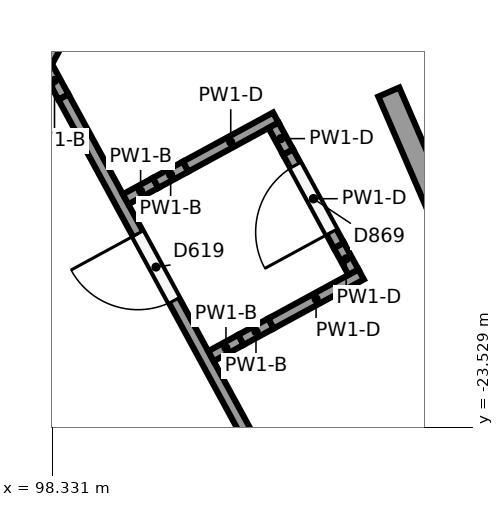
"""IFC4 building model, lengths in metres.
Left out: names, types, materials, properties, quantities, classifications, styles, units other than length and angle.
Written with IfcOpenShell. Run it as: python <this file> out.ifc"""

import sys

from ifc_helpers import new_model, si_unit, direction, frame, frame_2d, origin, origin_2d, place, context, subcontext, project, spatial, rectangle, circle, extrude, element, fill, save


model = new_model("IFC4")
c1 = context("Model", 3, precision=1e-05, world=origin(), true_north=direction((0.0, 1.0)))
c2 = subcontext(c1, "Body", "Model", "MODEL_VIEW")
j1 = project(units=[si_unit("LENGTHUNIT", "METRE"), si_unit("PLANEANGLEUNIT", "RADIAN")], contexts=[c1])
p1 = place(None, origin())
s1 = spatial("IfcSite", under=j1, at=p1, CompositionType="ELEMENT")
p2 = place(p1, origin())
s2 = spatial("IfcBuilding", under=s1, at=p2, CompositionType="ELEMENT")
p3 = place(p2, origin())
s3 = spatial("IfcBuildingStorey", under=s2, at=p3, CompositionType="ELEMENT", Elevation=0.0)
for number, where, z_axis, x_axis in (
    (1, (98.6, -18.75, -0.3), (0.0, 0.0, 1.0), (1.0, 0.0, 0.0)),
    (2, (102.6, -18.75, -0.3), (0.0, 0.0, 1.0), (1.0, 0.0, 0.0)),
):
    element("IfcColumn", number, at=place(p3, frame(where, z_axis=z_axis, x_axis=x_axis)), inside=s3, PredefinedType="COLUMN", context=c2, shape_type="SweptSolid", body=[
        extrude(circle(Radius=0.4, at=origin_2d()), origin(), (0.0, 0.0, 1.0), 6.8),
    ])
p4 = place(p3, frame((102.759, -19.117, 0.0), z_axis=(0.0, 0.0, 1.0), x_axis=(0.396578253752, -0.918000919744, 0.0)))
e3 = element("IfcWall", 3, at=p4, inside=s3, PredefinedType="SOLIDWALL", context=c2, shape_type="SweptSolid", body=[
    extrude(rectangle(XDim=4.208, YDim=0.3, at=frame_2d((2.104, 0.0))), origin(), (0.0, 0.0, 1.0), 4.85),
])
p5 = place(p3, frame((94.815, -19.145, 0.0), z_axis=(0.0, 0.0, 1.0), x_axis=(0.477867771117, -0.878431780691, 0.0)))
e4 = element("IfcWall", 4, at=p5, inside=s3, PredefinedType="SOLIDWALL", context=c2, shape_type="SweptSolid", body=[
    extrude(rectangle(XDim=13.28, YDim=0.3, at=frame_2d((6.64, 0.0))), origin(), (0.0, 0.0, 1.0), 4.85),
])
p6 = place(p5, frame((2.45, 0.0, 0.0)))
e5 = element("IfcOpeningElement", 5, at=p6, cuts=e4, PredefinedType="OPENING", context=c2, shape_type="SweptSolid", body=[
    extrude(rectangle(XDim=1.0, YDim=2.1, at=frame_2d((0.5, 1.05))), frame((0.0, 0.16, 0.0), z_axis=(0.0, -1.0, 0.0), x_axis=(1.0, 0.0, 0.0)), (0.0, 0.0, 1.0), 0.32),
])
p7 = place(p3, frame((104.808, -30.819, 0.0), z_axis=(0.0, 0.0, 1.0), x_axis=(-0.477860264875, 0.878435864052, 0.0)))
e6 = element("IfcWall", 6, at=p7, inside=s3, PredefinedType="PARTITIONING", context=c2, shape_type="SweptSolid", body=[
    extrude(rectangle(XDim=13.249, YDim=0.15, at=frame_2d((6.625, 0.0))), origin(), (0.0, 0.0, 1.0), 4.85),
])
p8 = place(p7, frame((10.2, 0.0, 0.0)))
e7 = element("IfcOpeningElement", 7, at=p8, cuts=e6, PredefinedType="OPENING", context=c2, shape_type="SweptSolid", body=[
    extrude(rectangle(XDim=1.0, YDim=2.1, at=frame_2d((0.5, 1.05))), frame((0.0, 0.085, 0.0), z_axis=(0.0, -1.0, 0.0), x_axis=(1.0, 0.0, 0.0)), (0.0, 0.0, 1.0), 0.17),
])
p9 = place(p3, frame((98.477, -19.181, 0.0), z_axis=(0.0, 0.0, 1.0), x_axis=(-0.477805639801, 0.878465577342, 0.0)))
e8 = element("IfcWall", 8, at=p9, inside=s3, PredefinedType="PARTITIONING", context=c2, shape_type="SweptSolid", body=[
    extrude(rectangle(XDim=0.49, YDim=0.15, at=frame_2d((0.245, 0.0))), origin(), (0.0, 0.0, 1.0), 4.85),
])
p10 = place(p3, frame((98.243, -18.75, 0.0), z_axis=(0.0, 0.0, 1.0), x_axis=(0.477924582155, 0.878400873048, 0.0)))
e9 = element("IfcWall", 9, at=p10, inside=s3, PredefinedType="PARTITIONING", context=c2, shape_type="SweptSolid", body=[
    extrude(rectangle(XDim=0.498, YDim=0.15, at=frame_2d((0.249, 0.0))), origin(), (0.0, 0.0, 1.0), 4.85),
])
for number, where, z_axis, x_axis in (
    (10, (100.418, -22.592, 0.0), (0.0, 0.0, 1.0), (0.878, 0.478, 0.0)),
    (11, (100.813, -22.377, 0.0), (0.0, 0.0, 1.0), (0.878, 0.478, 0.0)),
):
    element("IfcWall", number, at=place(p3, frame(where, z_axis=z_axis, x_axis=x_axis)), inside=s3, PredefinedType="PARTITIONING", context=c2, shape_type="SweptSolid", body=[
        extrude(rectangle(XDim=0.45, YDim=0.15, at=frame_2d((0.225, 0.0))), origin(), (0.0, 0.0, 1.0), 4.85),
    ])
p11 = place(p3, frame((101.209, -22.162, 0.0), z_axis=(0.0, 0.0, 1.0), x_axis=(0.878447942246, 0.477838061234, 0.0)))
e12 = element("IfcWall", 12, at=p11, inside=s3, PredefinedType="PARTITIONING", context=c2, shape_type="SweptSolid", body=[
    extrude(rectangle(XDim=1.35, YDim=0.15, at=frame_2d((0.675, 0.0))), origin(), (0.0, 0.0, 1.0), 6.1),
])
for number, where, z_axis, x_axis in (
    (13, (99.295, -20.528, 0.0), (0.0, 0.0, 1.0), (0.878, 0.478, 0.0)),
    (14, (99.69, -20.312, 0.0), (0.0, 0.0, 1.0), (0.878, 0.478, 0.0)),
):
    element("IfcWall", number, at=place(p3, frame(where, z_axis=z_axis, x_axis=x_axis)), inside=s3, PredefinedType="PARTITIONING", context=c2, shape_type="SweptSolid", body=[
        extrude(rectangle(XDim=0.45, YDim=0.15, at=frame_2d((0.225, 0.0))), origin(), (0.0, 0.0, 1.0), 4.85),
    ])
p12 = place(p3, frame((100.086, -20.097, 0.0), z_axis=(0.0, 0.0, 1.0), x_axis=(0.878447942246, 0.477838061234, 0.0)))
e15 = element("IfcWall", 15, at=p12, inside=s3, PredefinedType="PARTITIONING", context=c2, shape_type="SweptSolid", body=[
    extrude(rectangle(XDim=1.35, YDim=0.15, at=frame_2d((0.675, 0.0))), origin(), (0.0, 0.0, 1.0), 6.1),
])
p13 = place(p3, frame((102.293, -21.487, 0.0), z_axis=(0.0, 0.0, 1.0), x_axis=(-0.477953755799, 0.878384999483, 0.0)))
e16 = element("IfcWall", 16, at=p13, inside=s3, PredefinedType="PARTITIONING", context=c2, shape_type="SweptSolid", body=[
    extrude(rectangle(XDim=0.4, YDim=0.15, at=frame_2d((0.2, 0.0))), origin(), (0.0, 0.0, 1.0), 6.1),
])
p14 = place(p3, frame((102.102, -21.135, 0.0), z_axis=(0.0, 0.0, 1.0), x_axis=(-0.477984423658, 0.878368311553, 0.0)))
e17 = element("IfcWall", 17, at=p14, inside=s3, PredefinedType="PARTITIONING", context=c2, shape_type="SweptSolid", body=[
    extrude(rectangle(XDim=1.4, YDim=0.15, at=frame_2d((0.7, 0.0))), origin(), (0.0, 0.0, 1.0), 6.1),
])
p15 = place(p14, frame((0.2, 0.0, 0.0)))
e18 = element("IfcOpeningElement", 18, at=p15, cuts=e17, PredefinedType="OPENING", context=c2, shape_type="SweptSolid", body=[
    extrude(rectangle(XDim=1.0, YDim=2.1, at=frame_2d((0.5, 1.05))), frame((0.0, 0.085, 0.0), z_axis=(0.0, -1.0, 0.0), x_axis=(1.0, 0.0, 0.0)), (0.0, 0.0, 1.0), 0.17),
])
p16 = place(p3, frame((101.433, -19.906, 0.0), z_axis=(0.0, 0.0, 1.0), x_axis=(-0.477226530971, 0.878780312785, 0.0)))
e19 = element("IfcWall", 19, at=p16, inside=s3, PredefinedType="PARTITIONING", context=c2, shape_type="SweptSolid", body=[
    extrude(rectangle(XDim=0.4, YDim=0.15, at=frame_2d((0.2, 0.0))), origin(), (0.0, 0.0, 1.0), 6.1),
])
p17 = place(p8, origin())
e20 = element("IfcDoor", 20, at=p17, inside=s3, OperationType="SINGLE_SWING_RIGHT", PredefinedType="DOOR", context=c2, shape_type="SweptSolid", body=[
    extrude(rectangle(XDim=1.0, YDim=2.1, at=frame_2d((0.5, 1.05))), frame((0.0, 0.025, 0.0), z_axis=(0.0, -1.0, 0.0), x_axis=(1.0, 0.0, 0.0)), (0.0, 0.0, 1.0), 0.05),
])
fill(e7, e20)
p18 = place(p15, origin())
e21 = element("IfcDoor", 21, at=p18, inside=s3, OperationType="SINGLE_SWING_LEFT", PredefinedType="DOOR", context=c2, shape_type="SweptSolid", body=[
    extrude(rectangle(XDim=1.0, YDim=2.1, at=frame_2d((0.5, 1.05))), frame((0.0, 0.025, 0.0), z_axis=(0.0, -1.0, 0.0), x_axis=(1.0, 0.0, 0.0)), (0.0, 0.0, 1.0), 0.05),
])
fill(e18, e21)
save(model, sys.argv[1])
